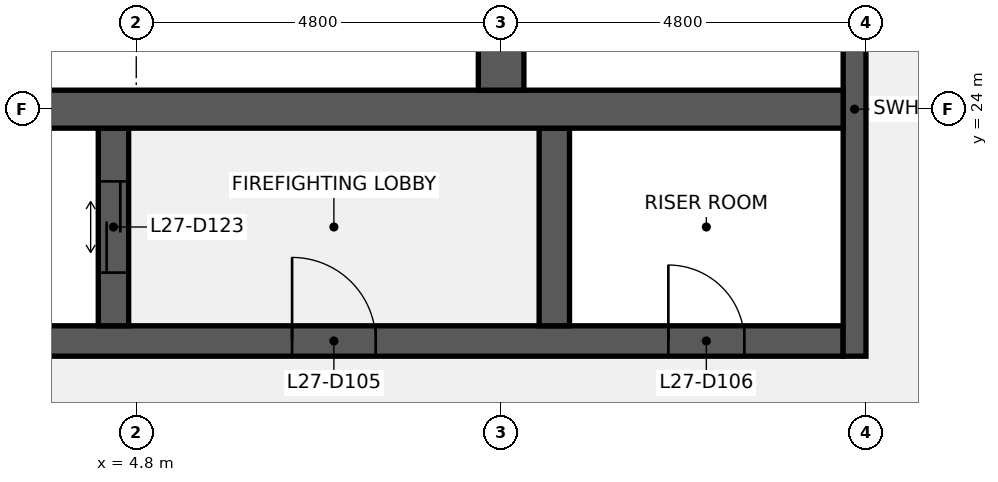
"""IFC4 building model, lengths in metres.
Left out: names, types, materials, properties, quantities, classifications, styles, units other than length and angle.
Written with IfcOpenShell. Run it as: python <this file> out.ifc"""

import sys

from ifc_helpers import new_model, si_unit, direction, frame, frame_2d, origin, place, context, subcontext, project, spatial, rectangle, extrude, element, fill, save


model = new_model("IFC4")
c1 = context("Model", 3, precision=1e-05, world=origin(), true_north=direction((0.0, 1.0)))
c2 = subcontext(c1, "Body", "Model", "MODEL_VIEW")
j1 = project(units=[si_unit("LENGTHUNIT", "METRE"), si_unit("PLANEANGLEUNIT", "RADIAN")], contexts=[c1])
p1 = place(None, origin())
s1 = spatial("IfcSite", under=j1, at=p1, CompositionType="ELEMENT")
p2 = place(p1, origin())
s2 = spatial("IfcBuilding", under=s1, at=p2, CompositionType="ELEMENT")
p3 = place(p2, frame((0.0, 0.0, 128.1)))
s3 = spatial("IfcBuildingStorey", under=s2, at=p3, CompositionType="ELEMENT", Elevation=128.1)
p4 = place(p3, frame((1.0, 20.95, 0.0), z_axis=(0.0, 0.0, 1.0), x_axis=(1.0, 0.0, 0.0)))
e1 = element("IfcWall", 1, at=p4, inside=s3, PredefinedType="SHEAR", context=c2, shape_type="SweptSolid", body=[
    extrude(rectangle(XDim=13.1, YDim=0.4, at=frame_2d((6.55, 0.0))), origin(), (0.0, 0.0, 1.0), 3.84),
])
p5 = place(p4, frame((5.85, 0.0, 0.0)))
e2 = element("IfcOpeningElement", 2, at=p5, cuts=e1, PredefinedType="OPENING", context=c2, shape_type="SweptSolid", body=[
    extrude(rectangle(XDim=1.1, YDim=2.1, at=frame_2d((0.55, 1.05))), frame((0.0, 0.21, 0.0), z_axis=(0.0, -1.0, 0.0), x_axis=(1.0, 0.0, 0.0)), (0.0, 0.0, 1.0), 0.42),
])
p6 = place(p4, frame((10.8, 0.0, 0.0)))
e3 = element("IfcOpeningElement", 3, at=p6, cuts=e1, PredefinedType="OPENING", context=c2, shape_type="SweptSolid", body=[
    extrude(rectangle(XDim=1.0, YDim=2.1, at=frame_2d((0.5, 1.05))), frame((0.0, 0.21, 0.0), z_axis=(0.0, -1.0, 0.0), x_axis=(1.0, 0.0, 0.0)), (0.0, 0.0, 1.0), 0.42),
])
p7 = place(p3, frame((14.25, 20.75, 0.0), z_axis=(0.0, 0.0, 1.0), x_axis=(0.0, 1.0, 0.0)))
e4 = element("IfcWall", 4, at=p7, inside=s3, PredefinedType="SHEAR", context=c2, shape_type="SweptSolid", body=[
    extrude(rectangle(XDim=6.5, YDim=0.3, at=frame_2d((3.25, 0.0))), origin(), (0.0, 0.0, 1.0), 3.84),
])
p8 = place(p3, frame((4.5, 21.15, 0.0), z_axis=(0.0, 0.0, 1.0), x_axis=(0.0, 1.0, 0.0)))
e5 = element("IfcWall", 5, at=p8, inside=s3, PredefinedType="SHEAR", context=c2, shape_type="SweptSolid", body=[
    extrude(rectangle(XDim=2.6, YDim=0.4, at=frame_2d((1.3, 0.0))), origin(), (0.0, 0.0, 1.0), 3.84),
])
p9 = place(p8, frame((0.7, 0.0, 0.0)))
e6 = element("IfcOpeningElement", 6, at=p9, cuts=e5, PredefinedType="OPENING", context=c2, shape_type="SweptSolid", body=[
    extrude(rectangle(XDim=1.2, YDim=2.1, at=frame_2d((0.6, 1.05))), frame((0.0, 0.21, 0.0), z_axis=(0.0, -1.0, 0.0), x_axis=(1.0, 0.0, 0.0)), (0.0, 0.0, 1.0), 0.42),
])
p10 = place(p3, frame((10.3, 21.15, 0.0), z_axis=(0.0, 0.0, 1.0), x_axis=(0.0, 1.0, 0.0)))
e7 = element("IfcWall", 7, at=p10, inside=s3, PredefinedType="SHEAR", context=c2, shape_type="SweptSolid", body=[
    extrude(rectangle(XDim=2.6, YDim=0.4, at=frame_2d((1.3, 0.0))), origin(), (0.0, 0.0, 1.0), 3.84),
])
p11 = place(p3, frame((1.0, 24.0, 0.0), z_axis=(0.0, 0.0, 1.0), x_axis=(1.0, 0.0, 0.0)))
e8 = element("IfcWall", 8, at=p11, inside=s3, PredefinedType="SHEAR", context=c2, shape_type="SweptSolid", body=[
    extrude(rectangle(XDim=13.1, YDim=0.5, at=frame_2d((6.55, 0.0))), origin(), (0.0, 0.0, 1.0), 3.84),
])
p12 = place(p3, frame((9.6, 24.25, 0.0), z_axis=(0.0, 0.0, 1.0), x_axis=(0.0, 1.0, 0.0)))
e9 = element("IfcWall", 9, at=p12, inside=s3, PredefinedType="SHEAR", context=c2, shape_type="SweptSolid", body=[
    extrude(rectangle(XDim=2.6, YDim=0.6, at=frame_2d((1.3, 0.0))), origin(), (0.0, 0.0, 1.0), 3.84),
])
p13 = place(p5, origin())
e10 = element("IfcDoor", 10, at=p13, inside=s3, OperationType="SINGLE_SWING_LEFT", PredefinedType="DOOR", context=c2, shape_type="SweptSolid", body=[
    extrude(rectangle(XDim=1.1, YDim=2.1, at=frame_2d((0.55, 1.05))), frame((0.0, 0.025, 0.0), z_axis=(0.0, -1.0, 0.0), x_axis=(1.0, 0.0, 0.0)), (0.0, 0.0, 1.0), 0.05),
])
fill(e2, e10)
p14 = place(p6, origin())
e11 = element("IfcDoor", 11, at=p14, inside=s3, OperationType="SINGLE_SWING_LEFT", PredefinedType="DOOR", context=c2, shape_type="SweptSolid", body=[
    extrude(rectangle(XDim=1.0, YDim=2.1, at=frame_2d((0.5, 1.05))), frame((0.0, 0.025, 0.0), z_axis=(0.0, -1.0, 0.0), x_axis=(1.0, 0.0, 0.0)), (0.0, 0.0, 1.0), 0.05),
])
fill(e3, e11)
p15 = place(p9, origin())
e12 = element("IfcDoor", 12, at=p15, inside=s3, OperationType="DOUBLE_DOOR_SLIDING", PredefinedType="DOOR", context=c2, shape_type="SweptSolid", body=[
    extrude(rectangle(XDim=1.2, YDim=2.1, at=frame_2d((0.6, 1.05))), frame((0.0, 0.025, 0.0), z_axis=(0.0, -1.0, 0.0), x_axis=(1.0, 0.0, 0.0)), (0.0, 0.0, 1.0), 0.05),
])
fill(e6, e12)
save(model, sys.argv[1])
